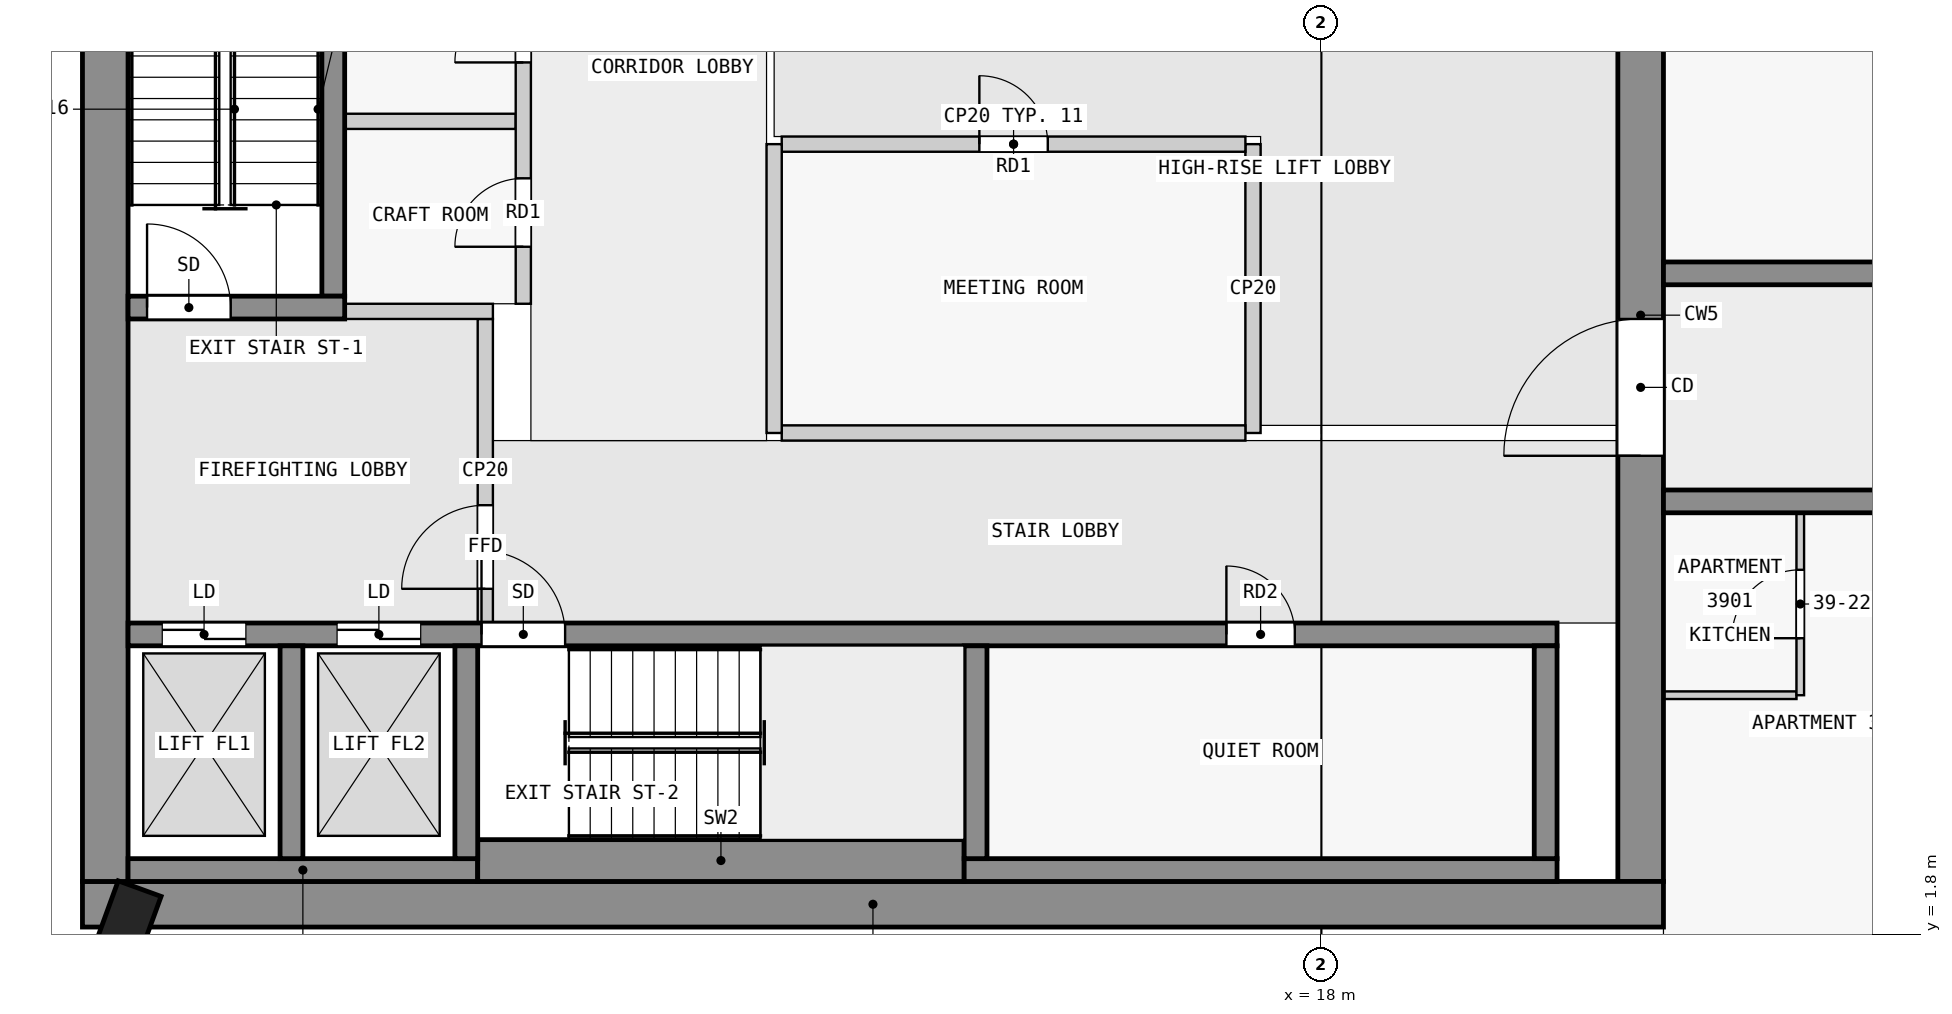
"""IFC4 building model, lengths in metres.
Left out: names, types, materials, properties, quantities, classifications, styles, units other than length and angle.
Written with IfcOpenShell. Run it as: python <this file> out.ifc"""

import sys

from ifc_helpers import new_model, si_unit, direction, frame, frame_2d, origin, origin_2d, place, context, subcontext, project, spatial, rectangle, extrude, element, fill, save


model = new_model("IFC4")
c1 = context("Model", 3, precision=1e-05, world=origin(), true_north=direction((0.0, 1.0)))
c2 = subcontext(c1, "Body", "Model", "MODEL_VIEW")
j1 = project(units=[si_unit("LENGTHUNIT", "METRE"), si_unit("PLANEANGLEUNIT", "RADIAN")], contexts=[c1])
p1 = place(None, origin())
s1 = spatial("IfcSite", under=j1, at=p1, CompositionType="ELEMENT")
p2 = place(p1, origin())
s2 = spatial("IfcBuilding", under=s1, at=p2, CompositionType="ELEMENT")
p3 = place(p2, frame((0.0, 0.0, 153.4)))
s3 = spatial("IfcBuildingStorey", under=s2, at=p3, CompositionType="ELEMENT", Elevation=153.4)
p4 = place(p3, frame((2.213, 1.748, 0.0), z_axis=(0.0, 0.0, 1.0), x_axis=(-0.939664280925, 0.342097996418, 0.0)))
e1 = element("IfcColumn", 1, at=p4, inside=s3, PredefinedType="COLUMN", context=c2, shape_type="SweptSolid", body=[
    extrude(rectangle(XDim=0.6, YDim=1.4, at=origin_2d()), origin(), (0.0, 0.0, 1.0), 3.5),
])
p5 = place(p3, frame((1.7, 2.2, 0.0), z_axis=(0.0, 0.0, 1.0), x_axis=(1.0, 0.0, 0.0)))
e2 = element("IfcWall", 2, at=p5, inside=s3, PredefinedType="SHEAR", context=c2, shape_type="SweptSolid", body=[
    extrude(rectangle(XDim=20.8, YDim=0.6, at=frame_2d((10.4, 0.0))), origin(), (0.0, 0.0, 1.0), 3.25),
])
p6 = place(p3, frame((2.0, 2.5, 0.0), z_axis=(0.0, 0.0, 1.0), x_axis=(0.0, 1.0, 0.0)))
e3 = element("IfcWall", 3, at=p6, inside=s3, PredefinedType="SHEAR", context=c2, shape_type="SweptSolid", body=[
    extrude(rectangle(XDim=14.9, YDim=0.6, at=frame_2d((7.45, 0.0))), origin(), (0.0, 0.0, 1.0), 3.25),
])
p7 = place(p3, frame((22.2, 2.5, 0.0), z_axis=(0.0, 0.0, 1.0), x_axis=(0.0, 1.0, 0.0)))
e4 = element("IfcWall", 4, at=p7, inside=s3, PredefinedType="SHEAR", context=c2, shape_type="SweptSolid", body=[
    extrude(rectangle(XDim=14.9, YDim=0.6, at=frame_2d((7.45, 0.0))), origin(), (0.0, 0.0, 1.0), 3.25),
])
p8 = place(p7, frame((5.6, 0.0, 0.0)))
e5 = element("IfcOpeningElement", 5, at=p8, cuts=e4, PredefinedType="OPENING", context=c2, shape_type="SweptSolid", body=[
    extrude(rectangle(XDim=1.8, YDim=2.1, at=frame_2d((0.9, 1.05))), frame((0.0, 0.31, 0.0), z_axis=(0.0, -1.0, 0.0), x_axis=(1.0, 0.0, 0.0)), (0.0, 0.0, 1.0), 0.62),
])
p9 = place(p3, frame((2.3, 2.65, 0.0), z_axis=(0.0, 0.0, 1.0), x_axis=(1.0, 0.0, 0.0)))
e6 = element("IfcWall", 6, at=p9, inside=s3, PredefinedType="SHEAR", context=c2, shape_type="SweptSolid", body=[
    extrude(rectangle(XDim=4.6, YDim=0.3, at=frame_2d((2.3, 0.0))), origin(), (0.0, 0.0, 1.0), 3.25),
])
p10 = place(p3, frame((6.9, 2.775, 0.0), z_axis=(0.0, 0.0, 1.0), x_axis=(1.0, 0.0, 0.0)))
e7 = element("IfcWall", 7, at=p10, inside=s3, PredefinedType="SHEAR", context=c2, shape_type="SweptSolid", body=[
    extrude(rectangle(XDim=6.4, YDim=0.55, at=frame_2d((3.2, 0.0))), origin(), (0.0, 0.0, 1.0), 3.25),
])
p11 = place(p3, frame((13.3, 2.65, 0.0), z_axis=(0.0, 0.0, 1.0), x_axis=(1.0, 0.0, 0.0)))
e8 = element("IfcWall", 8, at=p11, inside=s3, PredefinedType="SHEAR", context=c2, shape_type="SweptSolid", body=[
    extrude(rectangle(XDim=7.8, YDim=0.3, at=frame_2d((3.9, 0.0))), origin(), (0.0, 0.0, 1.0), 3.25),
])
for number, where, z_axis, x_axis in (
    (9, (4.45, 2.8, 0.0), (0.0, 0.0, 1.0), (0.0, 1.0, 0.0)),
    (10, (6.75, 2.8, 0.0), (0.0, 0.0, 1.0), (0.0, 1.0, 0.0)),
    (11, (13.45, 2.8, 0.0), (0.0, 0.0, 1.0), (0.0, 1.0, 0.0)),
    (12, (20.95, 2.8, 0.0), (0.0, 0.0, 1.0), (0.0, 1.0, 0.0)),
):
    element("IfcWall", number, at=place(p3, frame(where, z_axis=z_axis, x_axis=x_axis)), inside=s3, PredefinedType="SHEAR", context=c2, shape_type="SweptSolid", body=[
        extrude(rectangle(XDim=2.8, YDim=0.3, at=frame_2d((1.4, 0.0))), origin(), (0.0, 0.0, 1.0), 3.25),
    ])
p12 = place(p3, frame((2.3, 5.75, 0.0), z_axis=(0.0, 0.0, 1.0), x_axis=(1.0, 0.0, 0.0)))
e13 = element("IfcWall", 13, at=p12, inside=s3, PredefinedType="SHEAR", context=c2, shape_type="SweptSolid", body=[
    extrude(rectangle(XDim=18.8, YDim=0.3, at=frame_2d((9.4, 0.0))), origin(), (0.0, 0.0, 1.0), 3.25),
])
p13 = place(p12, frame((4.65, 0.0, 0.0)))
e14 = element("IfcOpeningElement", 14, at=p13, cuts=e13, PredefinedType="OPENING", context=c2, shape_type="SweptSolid", body=[
    extrude(rectangle(XDim=1.1, YDim=2.1, at=frame_2d((0.55, 1.05))), frame((0.0, 0.16, 0.0), z_axis=(0.0, -1.0, 0.0), x_axis=(1.0, 0.0, 0.0)), (0.0, 0.0, 1.0), 0.32),
])
p14 = place(p12, frame((0.45, 0.0, 0.0)))
e15 = element("IfcOpeningElement", 15, at=p14, cuts=e13, PredefinedType="OPENING", context=c2, shape_type="SweptSolid", body=[
    extrude(rectangle(XDim=1.1, YDim=2.1, at=frame_2d((0.55, 1.05))), frame((0.0, 0.16, 0.0), z_axis=(0.0, -1.0, 0.0), x_axis=(1.0, 0.0, 0.0)), (0.0, 0.0, 1.0), 0.32),
])
p15 = place(p12, frame((2.75, 0.0, 0.0)))
e16 = element("IfcOpeningElement", 16, at=p15, cuts=e13, PredefinedType="OPENING", context=c2, shape_type="SweptSolid", body=[
    extrude(rectangle(XDim=1.1, YDim=2.1, at=frame_2d((0.55, 1.05))), frame((0.0, 0.16, 0.0), z_axis=(0.0, -1.0, 0.0), x_axis=(1.0, 0.0, 0.0)), (0.0, 0.0, 1.0), 0.32),
])
p16 = place(p12, frame((14.45, 0.0, 0.0)))
e17 = element("IfcOpeningElement", 17, at=p16, cuts=e13, PredefinedType="OPENING", context=c2, shape_type="SweptSolid", body=[
    extrude(rectangle(XDim=0.9, YDim=2.1, at=frame_2d((0.45, 1.05))), frame((0.0, 0.16, 0.0), z_axis=(0.0, -1.0, 0.0), x_axis=(1.0, 0.0, 0.0)), (0.0, 0.0, 1.0), 0.32),
])
p17 = place(p3, frame((2.3, 10.05, 0.0), z_axis=(0.0, 0.0, 1.0), x_axis=(1.0, 0.0, 0.0)))
e18 = element("IfcWall", 18, at=p17, inside=s3, PredefinedType="SHEAR", context=c2, shape_type="SweptSolid", body=[
    extrude(rectangle(XDim=2.85, YDim=0.3, at=frame_2d((1.425, 0.0))), origin(), (0.0, 0.0, 1.0), 3.25),
])
p18 = place(p17, frame((0.25, 0.0, 0.0)))
e19 = element("IfcOpeningElement", 19, at=p18, cuts=e18, PredefinedType="OPENING", context=c2, shape_type="SweptSolid", body=[
    extrude(rectangle(XDim=1.1, YDim=2.1, at=frame_2d((0.55, 1.05))), frame((0.0, 0.16, 0.0), z_axis=(0.0, -1.0, 0.0), x_axis=(1.0, 0.0, 0.0)), (0.0, 0.0, 1.0), 0.32),
])
p19 = place(p3, frame((5.0, 10.2, 0.0), z_axis=(0.0, 0.0, 1.0), x_axis=(0.0, 1.0, 0.0)))
e20 = element("IfcWall", 20, at=p19, inside=s3, PredefinedType="SHEAR", context=c2, shape_type="SweptSolid", body=[
    extrude(rectangle(XDim=6.4, YDim=0.3, at=frame_2d((3.2, 0.0))), origin(), (0.0, 0.0, 1.0), 3.25),
])
p20 = place(p3, frame((22.5, 7.5, 0.0), z_axis=(0.0, 0.0, 1.0), x_axis=(1.0, 0.0, 0.0)))
e21 = element("IfcWall", 21, at=p20, inside=s3, PredefinedType="SHEAR", context=c2, shape_type="SweptSolid", body=[
    extrude(rectangle(XDim=22.5, YDim=0.3, at=frame_2d((11.25, 0.0))), origin(), (0.0, 0.0, 1.0), 3.25),
])
p21 = place(p20, frame((4.05, 0.0, 0.0)))
e22 = element("IfcOpeningElement", 22, at=p21, cuts=e21, PredefinedType="OPENING", context=c2, shape_type="SweptSolid", body=[
    extrude(rectangle(XDim=1.0, YDim=2.1, at=frame_2d((0.5, 1.05))), frame((0.0, 0.16, 0.0), z_axis=(0.0, -1.0, 0.0), x_axis=(1.0, 0.0, 0.0)), (0.0, 0.0, 1.0), 0.32),
])
p22 = place(p20, frame((10.35, 0.0, 0.0)))
e23 = element("IfcOpeningElement", 23, at=p22, cuts=e21, PredefinedType="OPENING", context=c2, shape_type="SweptSolid", body=[
    extrude(rectangle(XDim=1.8, YDim=2.1, at=frame_2d((0.9, 1.05))), frame((0.0, 0.16, 0.0), z_axis=(0.0, -1.0, 0.0), x_axis=(1.0, 0.0, 0.0)), (0.0, 0.0, 1.0), 0.32),
])
p23 = place(p20, frame((16.85, 0.0, 0.0)))
e24 = element("IfcOpeningElement", 24, at=p23, cuts=e21, PredefinedType="OPENING", context=c2, shape_type="SweptSolid", body=[
    extrude(rectangle(XDim=1.0, YDim=2.1, at=frame_2d((0.5, 1.05))), frame((0.0, 0.16, 0.0), z_axis=(0.0, -1.0, 0.0), x_axis=(1.0, 0.0, 0.0)), (0.0, 0.0, 1.0), 0.32),
])
p24 = place(p3, frame((22.5, 10.5, 0.0), z_axis=(0.0, 0.0, 1.0), x_axis=(1.0, 0.0, 0.0)))
e25 = element("IfcWall", 25, at=p24, inside=s3, PredefinedType="SHEAR", context=c2, shape_type="SweptSolid", body=[
    extrude(rectangle(XDim=22.5, YDim=0.3, at=frame_2d((11.25, 0.0))), origin(), (0.0, 0.0, 1.0), 3.25),
])
p25 = place(p24, frame((4.05, 0.0, 0.0)))
e26 = element("IfcOpeningElement", 26, at=p25, cuts=e25, PredefinedType="OPENING", context=c2, shape_type="SweptSolid", body=[
    extrude(rectangle(XDim=1.0, YDim=2.1, at=frame_2d((0.5, 1.05))), frame((0.0, 0.16, 0.0), z_axis=(0.0, -1.0, 0.0), x_axis=(1.0, 0.0, 0.0)), (0.0, 0.0, 1.0), 0.32),
])
p26 = place(p24, frame((11.65, 0.0, 0.0)))
e27 = element("IfcOpeningElement", 27, at=p26, cuts=e25, PredefinedType="OPENING", context=c2, shape_type="SweptSolid", body=[
    extrude(rectangle(XDim=1.0, YDim=2.1, at=frame_2d((0.5, 1.05))), frame((0.0, 0.16, 0.0), z_axis=(0.0, -1.0, 0.0), x_axis=(1.0, 0.0, 0.0)), (0.0, 0.0, 1.0), 0.32),
])
p27 = place(p24, frame((18.75, 0.0, 0.0)))
e28 = element("IfcOpeningElement", 28, at=p27, cuts=e25, PredefinedType="OPENING", context=c2, shape_type="SweptSolid", body=[
    extrude(rectangle(XDim=0.9, YDim=2.1, at=frame_2d((0.45, 1.05))), frame((0.0, 0.16, 0.0), z_axis=(0.0, -1.0, 0.0), x_axis=(1.0, 0.0, 0.0)), (0.0, 0.0, 1.0), 0.32),
])
p28 = place(p24, frame((20.95, 0.0, 0.0)))
e29 = element("IfcOpeningElement", 29, at=p28, cuts=e25, PredefinedType="OPENING", context=c2, shape_type="SweptSolid", body=[
    extrude(rectangle(XDim=1.0, YDim=2.1, at=frame_2d((0.5, 1.05))), frame((0.0, 0.16, 0.0), z_axis=(0.0, -1.0, 0.0), x_axis=(1.0, 0.0, 0.0)), (0.0, 0.0, 1.0), 0.32),
])
p29 = place(p3, frame((7.0, 5.9, 0.0), z_axis=(0.0, 0.0, 1.0), x_axis=(0.0, 1.0, 0.0)))
e30 = element("IfcWall", 30, at=p29, inside=s3, PredefinedType="PARTITIONING", context=c2, shape_type="SweptSolid", body=[
    extrude(rectangle(XDim=4.0, YDim=0.2, at=frame_2d((2.0, 0.0))), origin(), (0.0, 0.0, 1.0), 3.25),
])
p30 = place(p29, frame((0.45, 0.0, 0.0)))
e31 = element("IfcOpeningElement", 31, at=p30, cuts=e30, PredefinedType="OPENING", context=c2, shape_type="SweptSolid", body=[
    extrude(rectangle(XDim=1.1, YDim=2.1, at=frame_2d((0.55, 1.05))), frame((0.0, 0.11, 0.0), z_axis=(0.0, -1.0, 0.0), x_axis=(1.0, 0.0, 0.0)), (0.0, 0.0, 1.0), 0.22),
])
p31 = place(p3, frame((5.15, 10.0, 0.0), z_axis=(0.0, 0.0, 1.0), x_axis=(1.0, 0.0, 0.0)))
e32 = element("IfcWall", 32, at=p31, inside=s3, PredefinedType="PARTITIONING", context=c2, shape_type="SweptSolid", body=[
    extrude(rectangle(XDim=1.95, YDim=0.2, at=frame_2d((0.975, 0.0))), origin(), (0.0, 0.0, 1.0), 3.25),
])
p32 = place(p3, frame((10.8, 8.4, 0.0), z_axis=(0.0, 0.0, 1.0), x_axis=(0.0, 1.0, 0.0)))
e33 = element("IfcWall", 33, at=p32, inside=s3, PredefinedType="PARTITIONING", context=c2, shape_type="SweptSolid", body=[
    extrude(rectangle(XDim=3.8, YDim=0.2, at=frame_2d((1.9, 0.0))), origin(), (0.0, 0.0, 1.0), 3.25),
])
p33 = place(p3, frame((10.9, 8.4, 0.0), z_axis=(0.0, 0.0, 1.0), x_axis=(1.0, 0.0, 0.0)))
e34 = element("IfcWall", 34, at=p33, inside=s3, PredefinedType="PARTITIONING", context=c2, shape_type="SweptSolid", body=[
    extrude(rectangle(XDim=6.1, YDim=0.2, at=frame_2d((3.05, 0.0))), origin(), (0.0, 0.0, 1.0), 3.25),
])
p34 = place(p3, frame((17.1, 8.4, 0.0), z_axis=(0.0, 0.0, 1.0), x_axis=(0.0, 1.0, 0.0)))
e35 = element("IfcWall", 35, at=p34, inside=s3, PredefinedType="PARTITIONING", context=c2, shape_type="SweptSolid", body=[
    extrude(rectangle(XDim=3.8, YDim=0.2, at=frame_2d((1.9, 0.0))), origin(), (0.0, 0.0, 1.0), 3.25),
])
p35 = place(p3, frame((10.9, 12.2, 0.0), z_axis=(0.0, 0.0, 1.0), x_axis=(1.0, 0.0, 0.0)))
e36 = element("IfcWall", 36, at=p35, inside=s3, PredefinedType="PARTITIONING", context=c2, shape_type="SweptSolid", body=[
    extrude(rectangle(XDim=6.1, YDim=0.2, at=frame_2d((3.05, 0.0))), origin(), (0.0, 0.0, 1.0), 3.25),
])
p36 = place(p35, frame((2.6, 0.0, 0.0)))
e37 = element("IfcOpeningElement", 37, at=p36, cuts=e36, PredefinedType="OPENING", context=c2, shape_type="SweptSolid", body=[
    extrude(rectangle(XDim=0.9, YDim=2.1, at=frame_2d((0.45, 1.05))), frame((0.0, 0.11, 0.0), z_axis=(0.0, -1.0, 0.0), x_axis=(1.0, 0.0, 0.0)), (0.0, 0.0, 1.0), 0.22),
])
p37 = place(p3, frame((7.5, 10.1, 0.0), z_axis=(0.0, 0.0, 1.0), x_axis=(0.0, 1.0, 0.0)))
e38 = element("IfcWall", 38, at=p37, inside=s3, PredefinedType="PARTITIONING", context=c2, shape_type="SweptSolid", body=[
    extrude(rectangle(XDim=7.3, YDim=0.2, at=frame_2d((3.65, 0.0))), origin(), (0.0, 0.0, 1.0), 3.25),
])
p38 = place(p37, frame((0.75, 0.0, 0.0)))
e39 = element("IfcOpeningElement", 39, at=p38, cuts=e38, PredefinedType="OPENING", context=c2, shape_type="SweptSolid", body=[
    extrude(rectangle(XDim=0.9, YDim=2.1, at=frame_2d((0.45, 1.05))), frame((0.0, 0.11, 0.0), z_axis=(0.0, -1.0, 0.0), x_axis=(1.0, 0.0, 0.0)), (0.0, 0.0, 1.0), 0.22),
])
p39 = place(p37, frame((3.175, 0.0, 0.0)))
e40 = element("IfcOpeningElement", 40, at=p39, cuts=e38, PredefinedType="OPENING", context=c2, shape_type="SweptSolid", body=[
    extrude(rectangle(XDim=0.9, YDim=2.1, at=frame_2d((0.45, 1.05))), frame((0.0, 0.11, 0.0), z_axis=(0.0, -1.0, 0.0), x_axis=(1.0, 0.0, 0.0)), (0.0, 0.0, 1.0), 0.22),
])
p40 = place(p37, frame((5.25, 0.0, 0.0)))
e41 = element("IfcOpeningElement", 41, at=p40, cuts=e38, PredefinedType="OPENING", context=c2, shape_type="SweptSolid", body=[
    extrude(rectangle(XDim=0.9, YDim=2.1, at=frame_2d((0.45, 1.05))), frame((0.0, 0.11, 0.0), z_axis=(0.0, -1.0, 0.0), x_axis=(1.0, 0.0, 0.0)), (0.0, 0.0, 1.0), 0.22),
])
p41 = place(p3, frame((5.15, 12.5, 0.0), z_axis=(0.0, 0.0, 1.0), x_axis=(1.0, 0.0, 0.0)))
e42 = element("IfcWall", 42, at=p41, inside=s3, PredefinedType="PARTITIONING", context=c2, shape_type="SweptSolid", body=[
    extrude(rectangle(XDim=2.25, YDim=0.2, at=frame_2d((1.125, 0.0))), origin(), (0.0, 0.0, 1.0), 3.25),
])
p42 = place(p3, frame((22.5, 4.95, 0.0), z_axis=(0.0, 0.0, 1.0), x_axis=(1.0, 0.0, 0.0)))
e43 = element("IfcWall", 43, at=p42, inside=s3, PredefinedType="PARTITIONING", context=c2, shape_type="SweptSolid", body=[
    extrude(rectangle(XDim=1.75, YDim=0.1, at=frame_2d((0.875, 0.0))), origin(), (0.0, 0.0, 1.0), 3.25),
])
p43 = place(p3, frame((24.3, 4.95, 0.0), z_axis=(0.0, 0.0, 1.0), x_axis=(0.0, 1.0, 0.0)))
e44 = element("IfcWall", 44, at=p43, inside=s3, PredefinedType="PARTITIONING", context=c2, shape_type="SweptSolid", body=[
    extrude(rectangle(XDim=2.4, YDim=0.1, at=frame_2d((1.2, 0.0))), origin(), (0.0, 0.0, 1.0), 3.25),
])
p44 = place(p43, frame((0.75, 0.0, 0.0)))
e45 = element("IfcOpeningElement", 45, at=p44, cuts=e44, PredefinedType="OPENING", context=c2, shape_type="SweptSolid", body=[
    extrude(rectangle(XDim=0.9, YDim=2.1, at=frame_2d((0.45, 1.05))), frame((0.0, 0.06, 0.0), z_axis=(0.0, -1.0, 0.0), x_axis=(1.0, 0.0, 0.0)), (0.0, 0.0, 1.0), 0.12),
])
p45 = place(p30, origin())
e46 = element("IfcDoor", 46, at=p45, inside=s3, OperationType="SINGLE_SWING_LEFT", PredefinedType="DOOR", context=c2, shape_type="SweptSolid", body=[
    extrude(rectangle(XDim=1.1, YDim=2.1, at=frame_2d((0.55, 1.05))), frame((0.0, 0.025, 0.0), z_axis=(0.0, -1.0, 0.0), x_axis=(1.0, 0.0, 0.0)), (0.0, 0.0, 1.0), 0.05),
])
fill(e31, e46)
p46 = place(p18, origin())
e47 = element("IfcDoor", 47, at=p46, inside=s3, OperationType="SINGLE_SWING_RIGHT", PredefinedType="DOOR", context=c2, shape_type="SweptSolid", body=[
    extrude(rectangle(XDim=1.1, YDim=2.1, at=frame_2d((0.55, 1.05))), frame((0.0, 0.025, 0.0), z_axis=(0.0, -1.0, 0.0), x_axis=(1.0, 0.0, 0.0)), (0.0, 0.0, 1.0), 0.05),
])
fill(e19, e47)
p47 = place(p36, origin())
e48 = element("IfcDoor", 48, at=p47, inside=s3, OperationType="SINGLE_SWING_LEFT", PredefinedType="DOOR", context=c2, shape_type="SweptSolid", body=[
    extrude(rectangle(XDim=0.9, YDim=2.1, at=frame_2d((0.45, 1.05))), frame((0.0, 0.025, 0.0), z_axis=(0.0, -1.0, 0.0), x_axis=(1.0, 0.0, 0.0)), (0.0, 0.0, 1.0), 0.05),
])
fill(e37, e48)
p48 = place(p13, origin())
e49 = element("IfcDoor", 49, at=p48, inside=s3, OperationType="SINGLE_SWING_LEFT", PredefinedType="DOOR", context=c2, shape_type="SweptSolid", body=[
    extrude(rectangle(XDim=1.1, YDim=2.1, at=frame_2d((0.55, 1.05))), frame((0.0, 0.025, 0.0), z_axis=(0.0, -1.0, 0.0), x_axis=(1.0, 0.0, 0.0)), (0.0, 0.0, 1.0), 0.05),
])
fill(e14, e49)
p49 = place(p14, origin())
e50 = element("IfcDoor", 50, at=p49, inside=s3, OperationType="DOUBLE_DOOR_SLIDING", PredefinedType="DOOR", context=c2, shape_type="SweptSolid", body=[
    extrude(rectangle(XDim=1.1, YDim=2.1, at=frame_2d((0.55, 1.05))), frame((0.0, 0.025, 0.0), z_axis=(0.0, -1.0, 0.0), x_axis=(1.0, 0.0, 0.0)), (0.0, 0.0, 1.0), 0.05),
])
fill(e15, e50)
p50 = place(p15, origin())
e51 = element("IfcDoor", 51, at=p50, inside=s3, OperationType="DOUBLE_DOOR_SLIDING", PredefinedType="DOOR", context=c2, shape_type="SweptSolid", body=[
    extrude(rectangle(XDim=1.1, YDim=2.1, at=frame_2d((0.55, 1.05))), frame((0.0, 0.025, 0.0), z_axis=(0.0, -1.0, 0.0), x_axis=(1.0, 0.0, 0.0)), (0.0, 0.0, 1.0), 0.05),
])
fill(e16, e51)
p51 = place(p8, origin())
e52 = element("IfcDoor", 52, at=p51, inside=s3, OperationType="DOUBLE_DOOR_SINGLE_SWING", PredefinedType="DOOR", context=c2, shape_type="SweptSolid", body=[
    extrude(rectangle(XDim=1.8, YDim=2.1, at=frame_2d((0.9, 1.05))), frame((0.0, 0.025, 0.0), z_axis=(0.0, -1.0, 0.0), x_axis=(1.0, 0.0, 0.0)), (0.0, 0.0, 1.0), 0.05),
])
fill(e5, e52)
p52 = place(p38, origin())
e53 = element("IfcDoor", 53, at=p52, inside=s3, OperationType="SINGLE_SWING_RIGHT", PredefinedType="DOOR", context=c2, shape_type="SweptSolid", body=[
    extrude(rectangle(XDim=0.9, YDim=2.1, at=frame_2d((0.45, 1.05))), frame((0.0, 0.025, 0.0), z_axis=(0.0, -1.0, 0.0), x_axis=(1.0, 0.0, 0.0)), (0.0, 0.0, 1.0), 0.05),
])
fill(e39, e53)
p53 = place(p39, origin())
e54 = element("IfcDoor", 54, at=p53, inside=s3, OperationType="SINGLE_SWING_RIGHT", PredefinedType="DOOR", context=c2, shape_type="SweptSolid", body=[
    extrude(rectangle(XDim=0.9, YDim=2.1, at=frame_2d((0.45, 1.05))), frame((0.0, 0.025, 0.0), z_axis=(0.0, -1.0, 0.0), x_axis=(1.0, 0.0, 0.0)), (0.0, 0.0, 1.0), 0.05),
])
fill(e40, e54)
p54 = place(p16, origin())
e55 = element("IfcDoor", 55, at=p54, inside=s3, OperationType="SINGLE_SWING_LEFT", PredefinedType="DOOR", context=c2, shape_type="SweptSolid", body=[
    extrude(rectangle(XDim=0.9, YDim=2.1, at=frame_2d((0.45, 1.05))), frame((0.0, 0.025, 0.0), z_axis=(0.0, -1.0, 0.0), x_axis=(1.0, 0.0, 0.0)), (0.0, 0.0, 1.0), 0.05),
])
fill(e17, e55)
p55 = place(p44, origin())
e56 = element("IfcDoor", 56, at=p55, inside=s3, OperationType="SINGLE_SWING_RIGHT", PredefinedType="DOOR", context=c2, shape_type="SweptSolid", body=[
    extrude(rectangle(XDim=0.9, YDim=2.1, at=frame_2d((0.45, 1.05))), frame((0.0, 0.025, 0.0), z_axis=(0.0, -1.0, 0.0), x_axis=(1.0, 0.0, 0.0)), (0.0, 0.0, 1.0), 0.05),
])
fill(e45, e56)
save(model, sys.argv[1])
